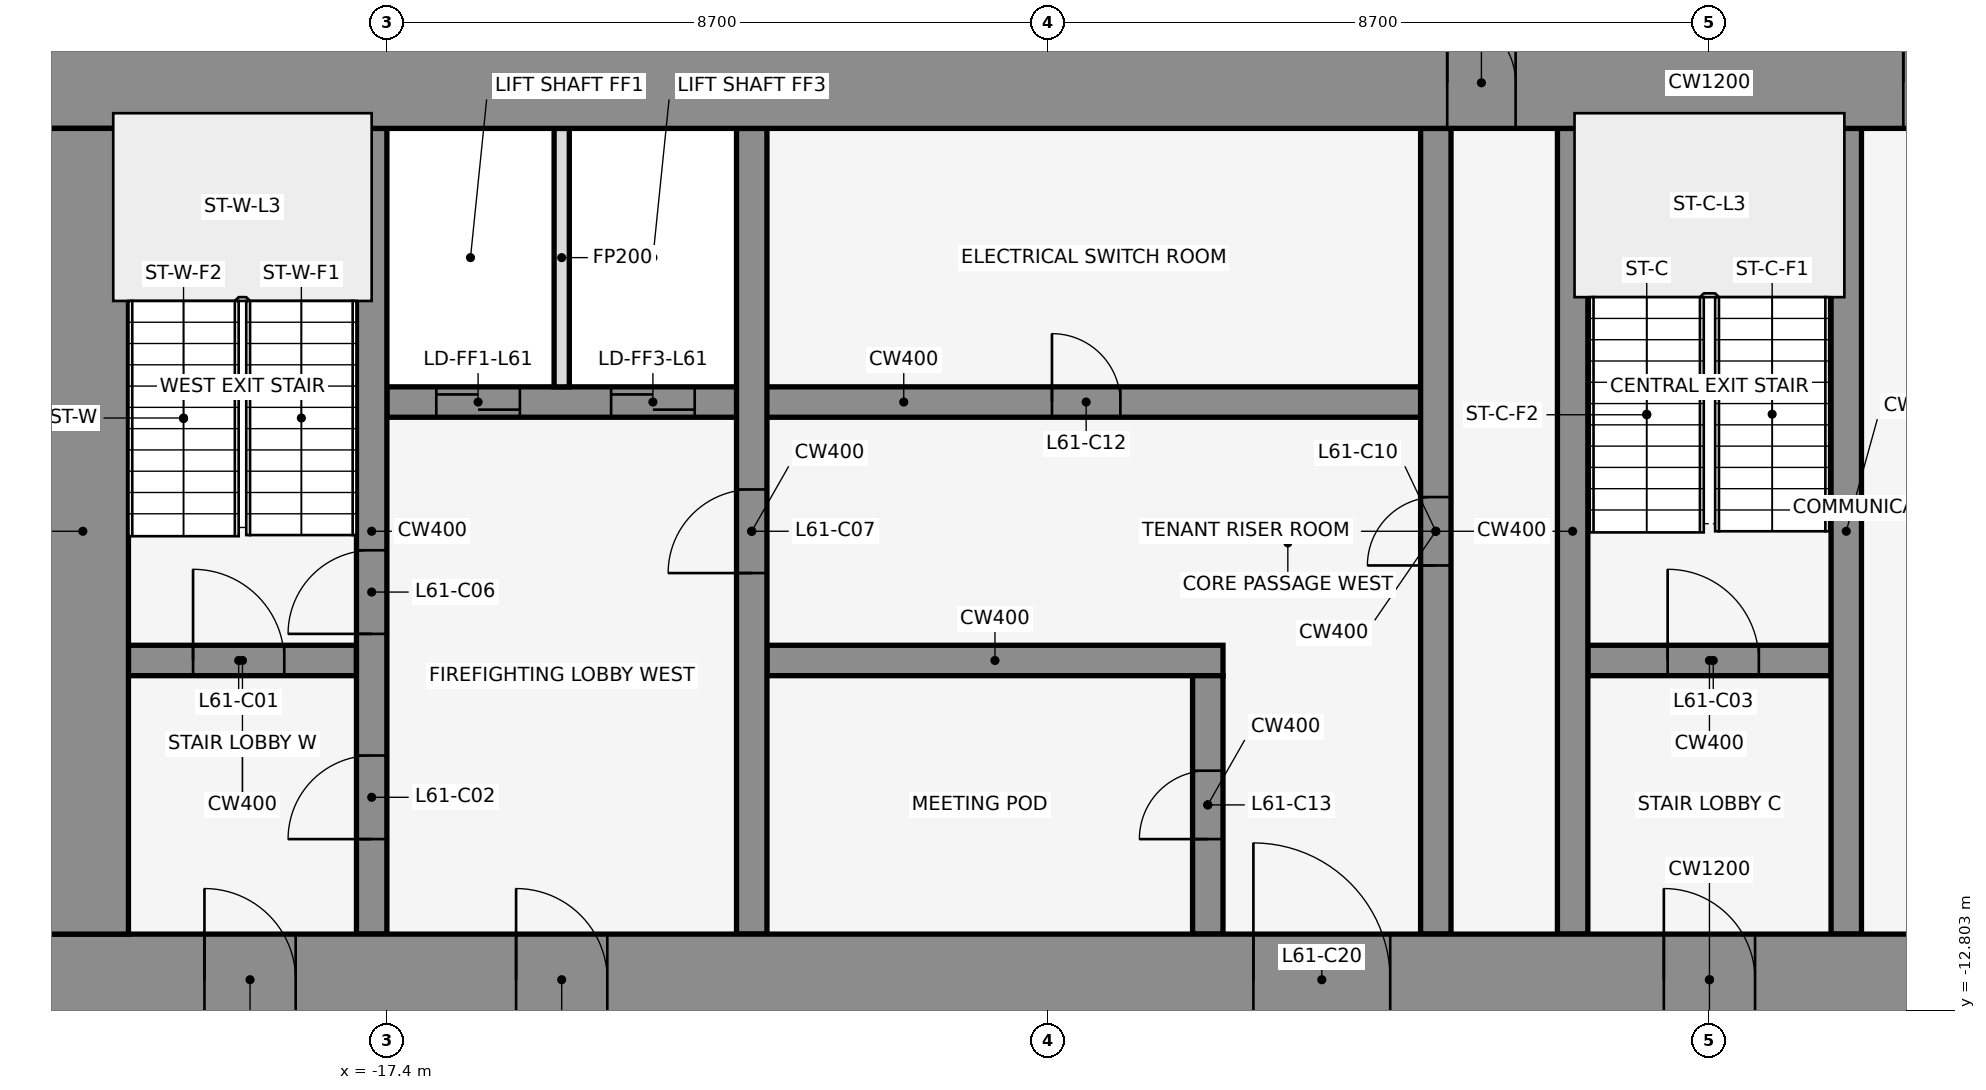
"""IFC4 building model, lengths in metres.
Left out: names, types, materials, properties, quantities, classifications, styles, units other than length and angle.
Written with IfcOpenShell. Run it as: python <this file> out.ifc"""

import sys

from ifc_helpers import new_model, si_unit, direction, frame, frame_2d, origin, place, context, subcontext, project, spatial, rectangle, extrude, element, fill, save


model = new_model("IFC4")
c1 = context("Model", 3, precision=1e-05, world=origin(), true_north=direction((0.0, 1.0)))
c2 = subcontext(c1, "Body", "Model", "MODEL_VIEW")
j1 = project(units=[si_unit("LENGTHUNIT", "METRE"), si_unit("PLANEANGLEUNIT", "RADIAN")], contexts=[c1])
p1 = place(None, origin())
s1 = spatial("IfcSite", under=j1, at=p1, CompositionType="ELEMENT")
p2 = place(p1, origin())
s2 = spatial("IfcBuilding", under=s1, at=p2, CompositionType="ELEMENT")
p3 = place(p2, frame((0.0, 0.0, 270.8)))
s3 = spatial("IfcBuildingStorey", under=s2, at=p3, CompositionType="ELEMENT", Elevation=270.8)
for number, where, z_axis, x_axis in (
    (1, (1.901, 1.08, 0.0), (0.0, 0.0, 1.0), (-0.84, -0.543, 0.0)),
    (2, (-0.068, -0.105, 0.0), (0.0, 0.0, 1.0), (-0.84, 0.543, 0.0)),
    (3, (-14.599, 1.08, 0.0), (0.0, 0.0, 1.0), (-0.84, -0.543, 0.0)),
):
    element("IfcWall", number, at=place(p3, frame(where, z_axis=z_axis, x_axis=x_axis)), inside=s3, PredefinedType="STANDARD", context=c2, shape_type="SweptSolid", body=[
        extrude(rectangle(XDim=2.183, YDim=0.25, at=frame_2d((1.091, 0.0))), origin(), (0.0, 0.0, 1.0), 4.05),
    ])
p4 = place(p3, frame((-20.8, -8.2, 0.0), z_axis=(0.0, 0.0, 1.0), x_axis=(1.0, 0.0, 0.0)))
e4 = element("IfcWall", 4, at=p4, inside=s3, PredefinedType="SHEAR", context=c2, shape_type="SweptSolid", body=[
    extrude(rectangle(XDim=3.0, YDim=0.4, at=frame_2d((1.5, 0.0))), origin(), (0.0, 0.0, 1.0), 4.2),
])
p5 = place(p4, frame((0.85, 0.0, 0.0)))
e5 = element("IfcOpeningElement", 5, at=p5, cuts=e4, PredefinedType="OPENING", context=c2, shape_type="SweptSolid", body=[
    extrude(rectangle(XDim=1.2, YDim=2.1, at=frame_2d((0.6, 1.05))), frame((0.0, 0.212, 0.0), z_axis=(0.0, -1.0, 0.0), x_axis=(1.0, 0.0, 0.0)), (0.0, 0.0, 1.0), 0.424),
])
p6 = place(p3, frame((-12.4, -8.2, 0.0), z_axis=(0.0, 0.0, 1.0), x_axis=(1.0, 0.0, 0.0)))
e6 = element("IfcWall", 6, at=p6, inside=s3, PredefinedType="SHEAR", context=c2, shape_type="SweptSolid", body=[
    extrude(rectangle(XDim=6.0, YDim=0.4, at=frame_2d((3.0, 0.0))), origin(), (0.0, 0.0, 1.0), 4.2),
])
p7 = place(p3, frame((-1.6, -8.2, 0.0), z_axis=(0.0, 0.0, 1.0), x_axis=(1.0, 0.0, 0.0)))
e7 = element("IfcWall", 7, at=p7, inside=s3, PredefinedType="SHEAR", context=c2, shape_type="SweptSolid", body=[
    extrude(rectangle(XDim=3.2, YDim=0.4, at=frame_2d((1.6, 0.0))), origin(), (0.0, 0.0, 1.0), 4.2),
])
p8 = place(p7, frame((1.05, 0.0, 0.0)))
e8 = element("IfcOpeningElement", 8, at=p8, cuts=e7, PredefinedType="OPENING", context=c2, shape_type="SweptSolid", body=[
    extrude(rectangle(XDim=1.2, YDim=2.1, at=frame_2d((0.6, 1.05))), frame((0.0, 0.212, 0.0), z_axis=(0.0, -1.0, 0.0), x_axis=(1.0, 0.0, 0.0)), (0.0, 0.0, 1.0), 0.424),
])
p9 = place(p3, frame((-17.4, -4.8, 0.0), z_axis=(0.0, 0.0, 1.0), x_axis=(1.0, 0.0, 0.0)))
e9 = element("IfcWall", 9, at=p9, inside=s3, PredefinedType="SHEAR", context=c2, shape_type="SweptSolid", body=[
    extrude(rectangle(XDim=13.6, YDim=0.4, at=frame_2d((6.8, 0.0))), origin(), (0.0, 0.0, 1.0), 4.2),
])
p10 = place(p9, frame((0.65, 0.0, 0.0)))
e10 = element("IfcOpeningElement", 10, at=p10, cuts=e9, PredefinedType="OPENING", context=c2, shape_type="SweptSolid", body=[
    extrude(rectangle(XDim=1.1, YDim=2.1, at=frame_2d((0.55, 1.05))), frame((0.0, 0.212, 0.0), z_axis=(0.0, -1.0, 0.0), x_axis=(1.0, 0.0, 0.0)), (0.0, 0.0, 1.0), 0.424),
])
p11 = place(p9, frame((2.95, 0.0, 0.0)))
e11 = element("IfcOpeningElement", 11, at=p11, cuts=e9, PredefinedType="OPENING", context=c2, shape_type="SweptSolid", body=[
    extrude(rectangle(XDim=1.1, YDim=2.1, at=frame_2d((0.55, 1.05))), frame((0.0, 0.212, 0.0), z_axis=(0.0, -1.0, 0.0), x_axis=(1.0, 0.0, 0.0)), (0.0, 0.0, 1.0), 0.424),
])
p12 = place(p9, frame((8.75, 0.0, 0.0)))
e12 = element("IfcOpeningElement", 12, at=p12, cuts=e9, PredefinedType="OPENING", context=c2, shape_type="SweptSolid", body=[
    extrude(rectangle(XDim=0.9, YDim=2.1, at=frame_2d((0.45, 1.05))), frame((0.0, 0.212, 0.0), z_axis=(0.0, -1.0, 0.0), x_axis=(1.0, 0.0, 0.0)), (0.0, 0.0, 1.0), 0.424),
])
p13 = place(p3, frame((-17.6, -11.8, 0.0), z_axis=(0.0, 0.0, 1.0), x_axis=(0.0, 1.0, 0.0)))
e13 = element("IfcWall", 13, at=p13, inside=s3, PredefinedType="SHEAR", context=c2, shape_type="SweptSolid", body=[
    extrude(rectangle(XDim=10.6, YDim=0.4, at=frame_2d((5.3, 0.0))), origin(), (0.0, 0.0, 1.0), 4.2),
])
p14 = place(p13, frame((1.25, 0.0, 0.0)))
e14 = element("IfcOpeningElement", 14, at=p14, cuts=e13, PredefinedType="OPENING", context=c2, shape_type="SweptSolid", body=[
    extrude(rectangle(XDim=1.1, YDim=2.1, at=frame_2d((0.55, 1.05))), frame((0.0, 0.212, 0.0), z_axis=(0.0, -1.0, 0.0), x_axis=(1.0, 0.0, 0.0)), (0.0, 0.0, 1.0), 0.424),
])
p15 = place(p13, frame((3.95, 0.0, 0.0)))
e15 = element("IfcOpeningElement", 15, at=p15, cuts=e13, PredefinedType="OPENING", context=c2, shape_type="SweptSolid", body=[
    extrude(rectangle(XDim=1.1, YDim=2.1, at=frame_2d((0.55, 1.05))), frame((0.0, 0.212, 0.0), z_axis=(0.0, -1.0, 0.0), x_axis=(1.0, 0.0, 0.0)), (0.0, 0.0, 1.0), 0.424),
])
p16 = place(p3, frame((-15.1, -4.6, 0.0), z_axis=(0.0, 0.0, 1.0), x_axis=(0.0, 1.0, 0.0)))
e16 = element("IfcWall", 16, at=p16, inside=s3, PredefinedType="PARTITIONING", context=c2, shape_type="SweptSolid", body=[
    extrude(rectangle(XDim=3.4, YDim=0.2, at=frame_2d((1.7, 0.0))), origin(), (0.0, 0.0, 1.0), 3.118),
])
p17 = place(p3, frame((-12.6, -11.8, 0.0), z_axis=(0.0, 0.0, 1.0), x_axis=(0.0, 1.0, 0.0)))
e17 = element("IfcWall", 17, at=p17, inside=s3, PredefinedType="SHEAR", context=c2, shape_type="SweptSolid", body=[
    extrude(rectangle(XDim=10.6, YDim=0.4, at=frame_2d((5.3, 0.0))), origin(), (0.0, 0.0, 1.0), 4.2),
])
p18 = place(p17, frame((4.75, 0.0, 0.0)))
e18 = element("IfcOpeningElement", 18, at=p18, cuts=e17, PredefinedType="OPENING", context=c2, shape_type="SweptSolid", body=[
    extrude(rectangle(XDim=1.1, YDim=2.1, at=frame_2d((0.55, 1.05))), frame((0.0, 0.212, 0.0), z_axis=(0.0, -1.0, 0.0), x_axis=(1.0, 0.0, 0.0)), (0.0, 0.0, 1.0), 0.424),
])
p19 = place(p3, frame((-6.6, -11.8, 0.0), z_axis=(0.0, 0.0, 1.0), x_axis=(0.0, 1.0, 0.0)))
e19 = element("IfcWall", 19, at=p19, inside=s3, PredefinedType="SHEAR", context=c2, shape_type="SweptSolid", body=[
    extrude(rectangle(XDim=3.4, YDim=0.4, at=frame_2d((1.7, 0.0))), origin(), (0.0, 0.0, 1.0), 4.2),
])
p20 = place(p19, frame((1.25, 0.0, 0.0)))
e20 = element("IfcOpeningElement", 20, at=p20, cuts=e19, PredefinedType="OPENING", context=c2, shape_type="SweptSolid", body=[
    extrude(rectangle(XDim=0.9, YDim=2.1, at=frame_2d((0.45, 1.05))), frame((0.0, 0.212, 0.0), z_axis=(0.0, -1.0, 0.0), x_axis=(1.0, 0.0, 0.0)), (0.0, 0.0, 1.0), 0.424),
])
p21 = place(p3, frame((-3.6, -11.8, 0.0), z_axis=(0.0, 0.0, 1.0), x_axis=(0.0, 1.0, 0.0)))
e21 = element("IfcWall", 21, at=p21, inside=s3, PredefinedType="SHEAR", context=c2, shape_type="SweptSolid", body=[
    extrude(rectangle(XDim=10.6, YDim=0.4, at=frame_2d((5.3, 0.0))), origin(), (0.0, 0.0, 1.0), 4.2),
])
p22 = place(p21, frame((4.85, 0.0, 0.0)))
e22 = element("IfcOpeningElement", 22, at=p22, cuts=e21, PredefinedType="OPENING", context=c2, shape_type="SweptSolid", body=[
    extrude(rectangle(XDim=0.9, YDim=2.1, at=frame_2d((0.45, 1.05))), frame((0.0, 0.212, 0.0), z_axis=(0.0, -1.0, 0.0), x_axis=(1.0, 0.0, 0.0)), (0.0, 0.0, 1.0), 0.424),
])
for number, where, z_axis, x_axis in (
    (23, (-1.8, -11.8, 0.0), (0.0, 0.0, 1.0), (0.0, 1.0, 0.0)),
    (24, (1.8, -11.8, 0.0), (0.0, 0.0, 1.0), (0.0, 1.0, 0.0)),
):
    element("IfcWall", number, at=place(p3, frame(where, z_axis=z_axis, x_axis=x_axis)), inside=s3, PredefinedType="SHEAR", context=c2, shape_type="SweptSolid", body=[
        extrude(rectangle(XDim=10.6, YDim=0.4, at=frame_2d((5.3, 0.0))), origin(), (0.0, 0.0, 1.0), 4.2),
    ])
p23 = place(p3, frame((-22.0, -0.6, 0.0), z_axis=(0.0, 0.0, 1.0), x_axis=(1.0, 0.0, 0.0)))
e25 = element("IfcWall", 25, at=p23, inside=s3, PredefinedType="SHEAR", context=c2, shape_type="SweptSolid", body=[
    extrude(rectangle(XDim=44.0, YDim=1.2, at=frame_2d((22.0, 0.0))), origin(), (0.0, 0.0, 1.0), 4.2),
])
p24 = place(p23, frame((18.55, 0.0, 0.0)))
e26 = element("IfcOpeningElement", 26, at=p24, cuts=e25, PredefinedType="OPENING", context=c2, shape_type="SweptSolid", body=[
    extrude(rectangle(XDim=0.9, YDim=2.1, at=frame_2d((0.45, 1.05))), frame((0.0, 0.612, 0.0), z_axis=(0.0, -1.0, 0.0), x_axis=(1.0, 0.0, 0.0)), (0.0, 0.0, 1.0), 1.224),
])
p25 = place(p23, frame((24.55, 0.0, 0.0)))
e27 = element("IfcOpeningElement", 27, at=p25, cuts=e25, PredefinedType="OPENING", context=c2, shape_type="SweptSolid", body=[
    extrude(rectangle(XDim=0.9, YDim=2.1, at=frame_2d((0.45, 1.05))), frame((0.0, 0.612, 0.0), z_axis=(0.0, -1.0, 0.0), x_axis=(1.0, 0.0, 0.0)), (0.0, 0.0, 1.0), 1.224),
])
p26 = place(p3, frame((-22.0, -12.4, 0.0), z_axis=(0.0, 0.0, 1.0), x_axis=(1.0, 0.0, 0.0)))
e28 = element("IfcWall", 28, at=p26, inside=s3, PredefinedType="SHEAR", context=c2, shape_type="SweptSolid", body=[
    extrude(rectangle(XDim=44.0, YDim=1.2, at=frame_2d((22.0, 0.0))), origin(), (0.0, 0.0, 1.0), 4.2),
])
p27 = place(p26, frame((2.2, 0.0, 0.0)))
e29 = element("IfcOpeningElement", 29, at=p27, cuts=e28, PredefinedType="OPENING", context=c2, shape_type="SweptSolid", body=[
    extrude(rectangle(XDim=1.2, YDim=2.1, at=frame_2d((0.6, 1.05))), frame((0.0, 0.612, 0.0), z_axis=(0.0, -1.0, 0.0), x_axis=(1.0, 0.0, 0.0)), (0.0, 0.0, 1.0), 1.224),
])
p28 = place(p26, frame((21.4, 0.0, 0.0)))
e30 = element("IfcOpeningElement", 30, at=p28, cuts=e28, PredefinedType="OPENING", context=c2, shape_type="SweptSolid", body=[
    extrude(rectangle(XDim=1.2, YDim=2.1, at=frame_2d((0.6, 1.05))), frame((0.0, 0.612, 0.0), z_axis=(0.0, -1.0, 0.0), x_axis=(1.0, 0.0, 0.0)), (0.0, 0.0, 1.0), 1.224),
])
p29 = place(p26, frame((40.6, 0.0, 0.0)))
e31 = element("IfcOpeningElement", 31, at=p29, cuts=e28, PredefinedType="OPENING", context=c2, shape_type="SweptSolid", body=[
    extrude(rectangle(XDim=1.2, YDim=2.1, at=frame_2d((0.6, 1.05))), frame((0.0, 0.612, 0.0), z_axis=(0.0, -1.0, 0.0), x_axis=(1.0, 0.0, 0.0)), (0.0, 0.0, 1.0), 1.224),
])
p30 = place(p26, frame((16.0, 0.0, 0.0)))
e32 = element("IfcOpeningElement", 32, at=p30, cuts=e28, PredefinedType="OPENING", context=c2, shape_type="SweptSolid", body=[
    extrude(rectangle(XDim=1.8, YDim=2.1, at=frame_2d((0.9, 1.05))), frame((0.0, 0.612, 0.0), z_axis=(0.0, -1.0, 0.0), x_axis=(1.0, 0.0, 0.0)), (0.0, 0.0, 1.0), 1.224),
])
p31 = place(p26, frame((6.3, 0.0, 0.0)))
e33 = element("IfcOpeningElement", 33, at=p31, cuts=e28, PredefinedType="OPENING", context=c2, shape_type="SweptSolid", body=[
    extrude(rectangle(XDim=1.2, YDim=2.1, at=frame_2d((0.6, 1.05))), frame((0.0, 0.612, 0.0), z_axis=(0.0, -1.0, 0.0), x_axis=(1.0, 0.0, 0.0)), (0.0, 0.0, 1.0), 1.224),
])
p32 = place(p26, frame((26.2, 0.0, 0.0)))
e34 = element("IfcOpeningElement", 34, at=p32, cuts=e28, PredefinedType="OPENING", context=c2, shape_type="SweptSolid", body=[
    extrude(rectangle(XDim=1.8, YDim=2.1, at=frame_2d((0.9, 1.05))), frame((0.0, 0.612, 0.0), z_axis=(0.0, -1.0, 0.0), x_axis=(1.0, 0.0, 0.0)), (0.0, 0.0, 1.0), 1.224),
])
p33 = place(p26, frame((36.5, 0.0, 0.0)))
e35 = element("IfcOpeningElement", 35, at=p33, cuts=e28, PredefinedType="OPENING", context=c2, shape_type="SweptSolid", body=[
    extrude(rectangle(XDim=1.2, YDim=2.1, at=frame_2d((0.6, 1.05))), frame((0.0, 0.612, 0.0), z_axis=(0.0, -1.0, 0.0), x_axis=(1.0, 0.0, 0.0)), (0.0, 0.0, 1.0), 1.224),
])
p34 = place(p3, frame((-21.4, -11.8, 0.0), z_axis=(0.0, 0.0, 1.0), x_axis=(0.0, 1.0, 0.0)))
e36 = element("IfcWall", 36, at=p34, inside=s3, PredefinedType="SHEAR", context=c2, shape_type="SweptSolid", body=[
    extrude(rectangle(XDim=10.6, YDim=1.2, at=frame_2d((5.3, 0.0))), origin(), (0.0, 0.0, 1.0), 4.2),
])
p35 = place(p5, origin())
e37 = element("IfcDoor", 37, at=p35, inside=s3, OperationType="SINGLE_SWING_LEFT", PredefinedType="DOOR", context=c2, shape_type="SweptSolid", body=[
    extrude(rectangle(XDim=1.2, YDim=2.1, at=frame_2d((0.6, 1.05))), frame((0.0, 0.025, 0.0), z_axis=(0.0, -1.0, 0.0), x_axis=(1.0, 0.0, 0.0)), (0.0, 0.0, 1.0), 0.05),
])
fill(e5, e37)
p36 = place(p14, frame((1.1, 0.0, 0.0), z_axis=(0.0, 0.0, 1.0), x_axis=(-1.0, 0.0, 0.0)))
e38 = element("IfcDoor", 38, at=p36, inside=s3, OperationType="SINGLE_SWING_LEFT", PredefinedType="DOOR", context=c2, shape_type="SweptSolid", body=[
    extrude(rectangle(XDim=1.1, YDim=2.1, at=frame_2d((0.55, 1.05))), frame((0.0, 0.025, 0.0), z_axis=(0.0, -1.0, 0.0), x_axis=(1.0, 0.0, 0.0)), (0.0, 0.0, 1.0), 0.05),
])
fill(e14, e38)
p37 = place(p8, origin())
e39 = element("IfcDoor", 39, at=p37, inside=s3, OperationType="SINGLE_SWING_LEFT", PredefinedType="DOOR", context=c2, shape_type="SweptSolid", body=[
    extrude(rectangle(XDim=1.2, YDim=2.1, at=frame_2d((0.6, 1.05))), frame((0.0, 0.025, 0.0), z_axis=(0.0, -1.0, 0.0), x_axis=(1.0, 0.0, 0.0)), (0.0, 0.0, 1.0), 0.05),
])
fill(e8, e39)
p38 = place(p10, origin())
e40 = element("IfcDoor", 40, at=p38, inside=s3, OperationType="DOUBLE_DOOR_SLIDING", PredefinedType="DOOR", context=c2, shape_type="SweptSolid", body=[
    extrude(rectangle(XDim=1.1, YDim=2.1, at=frame_2d((0.55, 1.05))), frame((0.0, 0.025, 0.0), z_axis=(0.0, -1.0, 0.0), x_axis=(1.0, 0.0, 0.0)), (0.0, 0.0, 1.0), 0.05),
])
fill(e10, e40)
p39 = place(p11, origin())
e41 = element("IfcDoor", 41, at=p39, inside=s3, OperationType="DOUBLE_DOOR_SLIDING", PredefinedType="DOOR", context=c2, shape_type="SweptSolid", body=[
    extrude(rectangle(XDim=1.1, YDim=2.1, at=frame_2d((0.55, 1.05))), frame((0.0, 0.025, 0.0), z_axis=(0.0, -1.0, 0.0), x_axis=(1.0, 0.0, 0.0)), (0.0, 0.0, 1.0), 0.05),
])
fill(e11, e41)
p40 = place(p15, frame((1.1, 0.0, 0.0), z_axis=(0.0, 0.0, 1.0), x_axis=(-1.0, 0.0, 0.0)))
e42 = element("IfcDoor", 42, at=p40, inside=s3, OperationType="SINGLE_SWING_LEFT", PredefinedType="DOOR", context=c2, shape_type="SweptSolid", body=[
    extrude(rectangle(XDim=1.1, YDim=2.1, at=frame_2d((0.55, 1.05))), frame((0.0, 0.025, 0.0), z_axis=(0.0, -1.0, 0.0), x_axis=(1.0, 0.0, 0.0)), (0.0, 0.0, 1.0), 0.05),
])
fill(e15, e42)
p41 = place(p18, origin())
e43 = element("IfcDoor", 43, at=p41, inside=s3, OperationType="SINGLE_SWING_LEFT", PredefinedType="DOOR", context=c2, shape_type="SweptSolid", body=[
    extrude(rectangle(XDim=1.1, YDim=2.1, at=frame_2d((0.55, 1.05))), frame((0.0, 0.025, 0.0), z_axis=(0.0, -1.0, 0.0), x_axis=(1.0, 0.0, 0.0)), (0.0, 0.0, 1.0), 0.05),
])
fill(e18, e43)
p42 = place(p22, frame((0.9, 0.0, 0.0), z_axis=(0.0, 0.0, 1.0), x_axis=(-1.0, 0.0, 0.0)))
e44 = element("IfcDoor", 44, at=p42, inside=s3, OperationType="SINGLE_SWING_LEFT", PredefinedType="DOOR", context=c2, shape_type="SweptSolid", body=[
    extrude(rectangle(XDim=0.9, YDim=2.1, at=frame_2d((0.45, 1.05))), frame((0.0, 0.025, 0.0), z_axis=(0.0, -1.0, 0.0), x_axis=(1.0, 0.0, 0.0)), (0.0, 0.0, 1.0), 0.05),
])
fill(e22, e44)
p43 = place(p12, origin())
e45 = element("IfcDoor", 45, at=p43, inside=s3, OperationType="SINGLE_SWING_RIGHT", PredefinedType="DOOR", context=c2, shape_type="SweptSolid", body=[
    extrude(rectangle(XDim=0.9, YDim=2.1, at=frame_2d((0.45, 1.05))), frame((0.0, 0.025, 0.0), z_axis=(0.0, -1.0, 0.0), x_axis=(1.0, 0.0, 0.0)), (0.0, 0.0, 1.0), 0.05),
])
fill(e12, e45)
p44 = place(p20, origin())
e46 = element("IfcDoor", 46, at=p44, inside=s3, OperationType="SINGLE_SWING_LEFT", PredefinedType="DOOR", context=c2, shape_type="SweptSolid", body=[
    extrude(rectangle(XDim=0.9, YDim=2.1, at=frame_2d((0.45, 1.05))), frame((0.0, 0.025, 0.0), z_axis=(0.0, -1.0, 0.0), x_axis=(1.0, 0.0, 0.0)), (0.0, 0.0, 1.0), 0.05),
])
fill(e20, e46)
p45 = place(p24, origin())
e47 = element("IfcDoor", 47, at=p45, inside=s3, OperationType="SINGLE_SWING_LEFT", PredefinedType="DOOR", context=c2, shape_type="SweptSolid", body=[
    extrude(rectangle(XDim=0.9, YDim=2.1, at=frame_2d((0.45, 1.05))), frame((0.0, 0.025, 0.0), z_axis=(0.0, -1.0, 0.0), x_axis=(1.0, 0.0, 0.0)), (0.0, 0.0, 1.0), 0.05),
])
fill(e26, e47)
p46 = place(p25, origin())
e48 = element("IfcDoor", 48, at=p46, inside=s3, OperationType="SINGLE_SWING_LEFT", PredefinedType="DOOR", context=c2, shape_type="SweptSolid", body=[
    extrude(rectangle(XDim=0.9, YDim=2.1, at=frame_2d((0.45, 1.05))), frame((0.0, 0.025, 0.0), z_axis=(0.0, -1.0, 0.0), x_axis=(1.0, 0.0, 0.0)), (0.0, 0.0, 1.0), 0.05),
])
fill(e27, e48)
p47 = place(p27, frame((1.2, 0.0, 0.0), z_axis=(0.0, 0.0, 1.0), x_axis=(-1.0, 0.0, 0.0)))
e49 = element("IfcDoor", 49, at=p47, inside=s3, OperationType="SINGLE_SWING_RIGHT", PredefinedType="DOOR", context=c2, shape_type="SweptSolid", body=[
    extrude(rectangle(XDim=1.2, YDim=2.1, at=frame_2d((0.6, 1.05))), frame((0.0, 0.025, 0.0), z_axis=(0.0, -1.0, 0.0), x_axis=(1.0, 0.0, 0.0)), (0.0, 0.0, 1.0), 0.05),
])
fill(e29, e49)
p48 = place(p28, frame((1.2, 0.0, 0.0), z_axis=(0.0, 0.0, 1.0), x_axis=(-1.0, 0.0, 0.0)))
e50 = element("IfcDoor", 50, at=p48, inside=s3, OperationType="SINGLE_SWING_RIGHT", PredefinedType="DOOR", context=c2, shape_type="SweptSolid", body=[
    extrude(rectangle(XDim=1.2, YDim=2.1, at=frame_2d((0.6, 1.05))), frame((0.0, 0.025, 0.0), z_axis=(0.0, -1.0, 0.0), x_axis=(1.0, 0.0, 0.0)), (0.0, 0.0, 1.0), 0.05),
])
fill(e30, e50)
p49 = place(p30, origin())
e51 = element("IfcDoor", 51, at=p49, inside=s3, OperationType="SINGLE_SWING_LEFT", PredefinedType="DOOR", context=c2, shape_type="SweptSolid", body=[
    extrude(rectangle(XDim=1.8, YDim=2.1, at=frame_2d((0.9, 1.05))), frame((0.0, 0.025, 0.0), z_axis=(0.0, -1.0, 0.0), x_axis=(1.0, 0.0, 0.0)), (0.0, 0.0, 1.0), 0.05),
])
fill(e32, e51)
p50 = place(p31, frame((1.2, 0.0, 0.0), z_axis=(0.0, 0.0, 1.0), x_axis=(-1.0, 0.0, 0.0)))
e52 = element("IfcDoor", 52, at=p50, inside=s3, OperationType="SINGLE_SWING_RIGHT", PredefinedType="DOOR", context=c2, shape_type="SweptSolid", body=[
    extrude(rectangle(XDim=1.2, YDim=2.1, at=frame_2d((0.6, 1.05))), frame((0.0, 0.025, 0.0), z_axis=(0.0, -1.0, 0.0), x_axis=(1.0, 0.0, 0.0)), (0.0, 0.0, 1.0), 0.05),
])
fill(e33, e52)
save(model, sys.argv[1])
